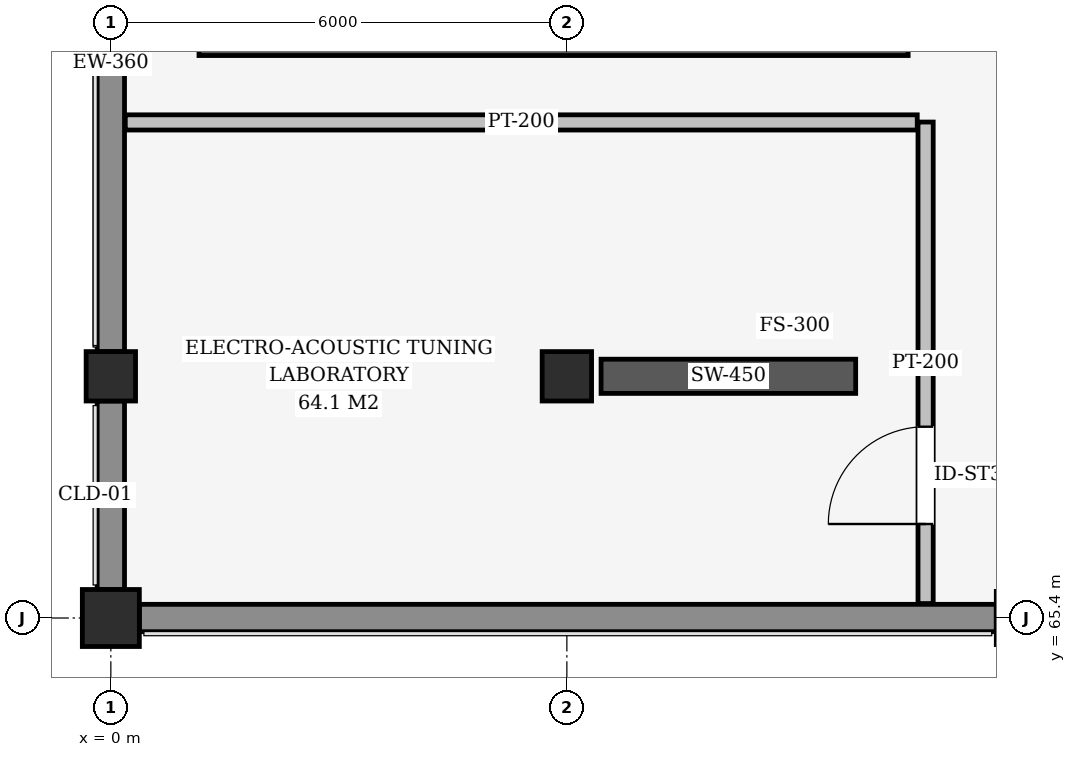
"""IFC4 building model, lengths in metres.
Left out: names, types, materials, properties, quantities, classifications, styles, units other than length and angle.
Written with IfcOpenShell. Run it as: python <this file> out.ifc"""

import sys

from ifc_helpers import new_model, si_unit, direction, frame, frame_2d, origin, origin_2d, place, context, subcontext, project, spatial, rectangle, extrude, element, fill, save


model = new_model("IFC4")
c1 = context("Model", 3, precision=1e-05, world=origin(), true_north=direction((0.0, 1.0)))
c2 = subcontext(c1, "Body", "Model", "MODEL_VIEW")
j1 = project(units=[si_unit("LENGTHUNIT", "METRE"), si_unit("PLANEANGLEUNIT", "RADIAN")], contexts=[c1])
p1 = place(None, origin())
s1 = spatial("IfcSite", under=j1, at=p1, CompositionType="ELEMENT")
p2 = place(p1, origin())
s2 = spatial("IfcBuilding", under=s1, at=p2, CompositionType="ELEMENT")
p3 = place(p2, frame((0.0, 0.0, 18.3)))
s3 = spatial("IfcBuildingStorey", under=s2, at=p3, CompositionType="ELEMENT", Elevation=18.3)
p4 = place(p3, frame((0.0, 65.4, 0.0), z_axis=(0.0, 0.0, 1.0), x_axis=(1.0, 0.0, 0.0)))
e1 = element("IfcColumn", 1, at=p4, inside=s3, PredefinedType="COLUMN", context=c2, shape_type="SweptSolid", body=[
    extrude(rectangle(XDim=0.75, YDim=0.75, at=origin_2d()), origin(), (0.0, 0.0, 1.0), 3.9),
])
for number, where, z_axis, x_axis in (
    (2, (0.0, 68.58, 0.0), (0.0, 0.0, 1.0), (1.0, 0.0, 0.0)),
    (3, (6.0, 68.58, 0.0), (0.0, 0.0, 1.0), (1.0, 0.0, 0.0)),
):
    element("IfcColumn", number, at=place(p3, frame(where, z_axis=z_axis, x_axis=x_axis)), inside=s3, PredefinedType="COLUMN", context=c2, shape_type="SweptSolid", body=[
        extrude(rectangle(XDim=0.65, YDim=0.65, at=origin_2d()), origin(), (0.0, 0.0, 1.0), 3.9),
    ])
p5 = place(p3, frame((6.45, 68.58, 0.0), z_axis=(0.0, 0.0, 1.0), x_axis=(1.0, 0.0, 0.0)))
e4 = element("IfcWall", 4, at=p5, inside=s3, PredefinedType="SHEAR", context=c2, shape_type="SweptSolid", body=[
    extrude(rectangle(XDim=3.35, YDim=0.45, at=frame_2d((1.675, 0.0))), origin(), (0.0, 0.0, 1.0), 2.3),
])
p6 = place(p3, frame((0.0, 65.775, 0.0), z_axis=(0.0, 0.0, 1.0), x_axis=(0.0, 1.0, 0.0)))
e5 = element("IfcWall", 5, at=p6, inside=s3, PredefinedType="SOLIDWALL", context=c2, shape_type="SweptSolid", body=[
    extrude(rectangle(XDim=2.48, YDim=0.36, at=frame_2d((1.24, 0.0))), origin(), (0.0, 0.0, 1.0), 2.928),
])
p7 = place(p3, frame((0.0, 68.905, 0.0), z_axis=(0.0, 0.0, 1.0), x_axis=(0.0, 1.0, 0.0)))
e6 = element("IfcWall", 6, at=p7, inside=s3, PredefinedType="SOLIDWALL", context=c2, shape_type="SweptSolid", body=[
    extrude(rectangle(XDim=13.57, YDim=0.36, at=frame_2d((6.785, 0.0))), origin(), (0.0, 0.0, 1.0), 2.93),
])
p8 = place(p7, frame((5.435, 0.0, 0.78)))
e7 = element("IfcOpeningElement", 7, at=p8, cuts=e6, PredefinedType="OPENING", context=c2, shape_type="SweptSolid", body=[
    extrude(rectangle(XDim=2.7, YDim=1.95, at=frame_2d((1.35, 0.975))), frame((0.0, 0.19, 0.0), z_axis=(0.0, -1.0, 0.0), x_axis=(1.0, 0.0, 0.0)), (0.0, 0.0, 1.0), 0.38),
])
p9 = place(p3, frame((11.65, 65.4, 0.0), z_axis=(0.0, 0.0, 1.0), x_axis=(-1.0, 0.0, 0.0)))
e8 = element("IfcWall", 8, at=p9, inside=s3, PredefinedType="SOLIDWALL", context=c2, shape_type="SweptSolid", body=[
    extrude(rectangle(XDim=11.275, YDim=0.36, at=frame_2d((5.637, 0.0))), origin(), (0.0, 0.0, 1.0), 2.929),
])
p10 = place(p3, frame((1.16, 72.945, 0.0), z_axis=(0.0, 0.0, 1.0), x_axis=(1.0, 0.0, 0.0)))
e9 = element("IfcWall", 9, at=p10, inside=s3, PredefinedType="SHEAR", context=c2, shape_type="SweptSolid", body=[
    extrude(rectangle(XDim=9.33, YDim=0.29, at=frame_2d((4.665, 0.0))), origin(), (0.0, 0.0, 1.0), 3.56),
])
p11 = place(p3, frame((10.72, 65.59, 0.0), z_axis=(0.0, 0.0, 1.0), x_axis=(0.0, 1.0, 0.0)))
e10 = element("IfcWall", 10, at=p11, inside=s3, PredefinedType="PARTITIONING", context=c2, shape_type="SweptSolid", body=[
    extrude(rectangle(XDim=6.335, YDim=0.2, at=frame_2d((3.167, 0.0))), origin(), (0.0, 0.0, 1.0), 2.996),
])
p12 = place(p11, frame((1.047, 0.0, 0.0)))
e11 = element("IfcOpeningElement", 11, at=p12, cuts=e10, PredefinedType="OPENING", context=c2, shape_type="SweptSolid", body=[
    extrude(rectangle(XDim=1.28, YDim=2.26, at=frame_2d((0.64, 1.13))), frame((0.0, 0.11, 0.0), z_axis=(0.0, -1.0, 0.0), x_axis=(1.0, 0.0, 0.0)), (0.0, 0.0, 1.0), 0.22),
])
p13 = place(p3, frame((0.19, 71.92, 0.0), z_axis=(0.0, 0.0, 1.0), x_axis=(1.0, 0.0, 0.0)))
e12 = element("IfcWall", 12, at=p13, inside=s3, PredefinedType="PARTITIONING", context=c2, shape_type="SweptSolid", body=[
    extrude(rectangle(XDim=10.42, YDim=0.2, at=frame_2d((5.21, 0.0))), origin(), (0.0, 0.0, 1.0), 3.54),
])
p14 = place(p12, origin())
e13 = element("IfcDoor", 13, at=p14, inside=s3, OperationType="SINGLE_SWING_LEFT", PredefinedType="DOOR", context=c2, shape_type="SweptSolid", body=[
    extrude(rectangle(XDim=1.28, YDim=2.26, at=frame_2d((0.64, 1.13))), frame((0.0, 0.025, 0.0), z_axis=(0.0, -1.0, 0.0), x_axis=(1.0, 0.0, 0.0)), (0.0, 0.0, 1.0), 0.05),
])
fill(e11, e13)
save(model, sys.argv[1])
